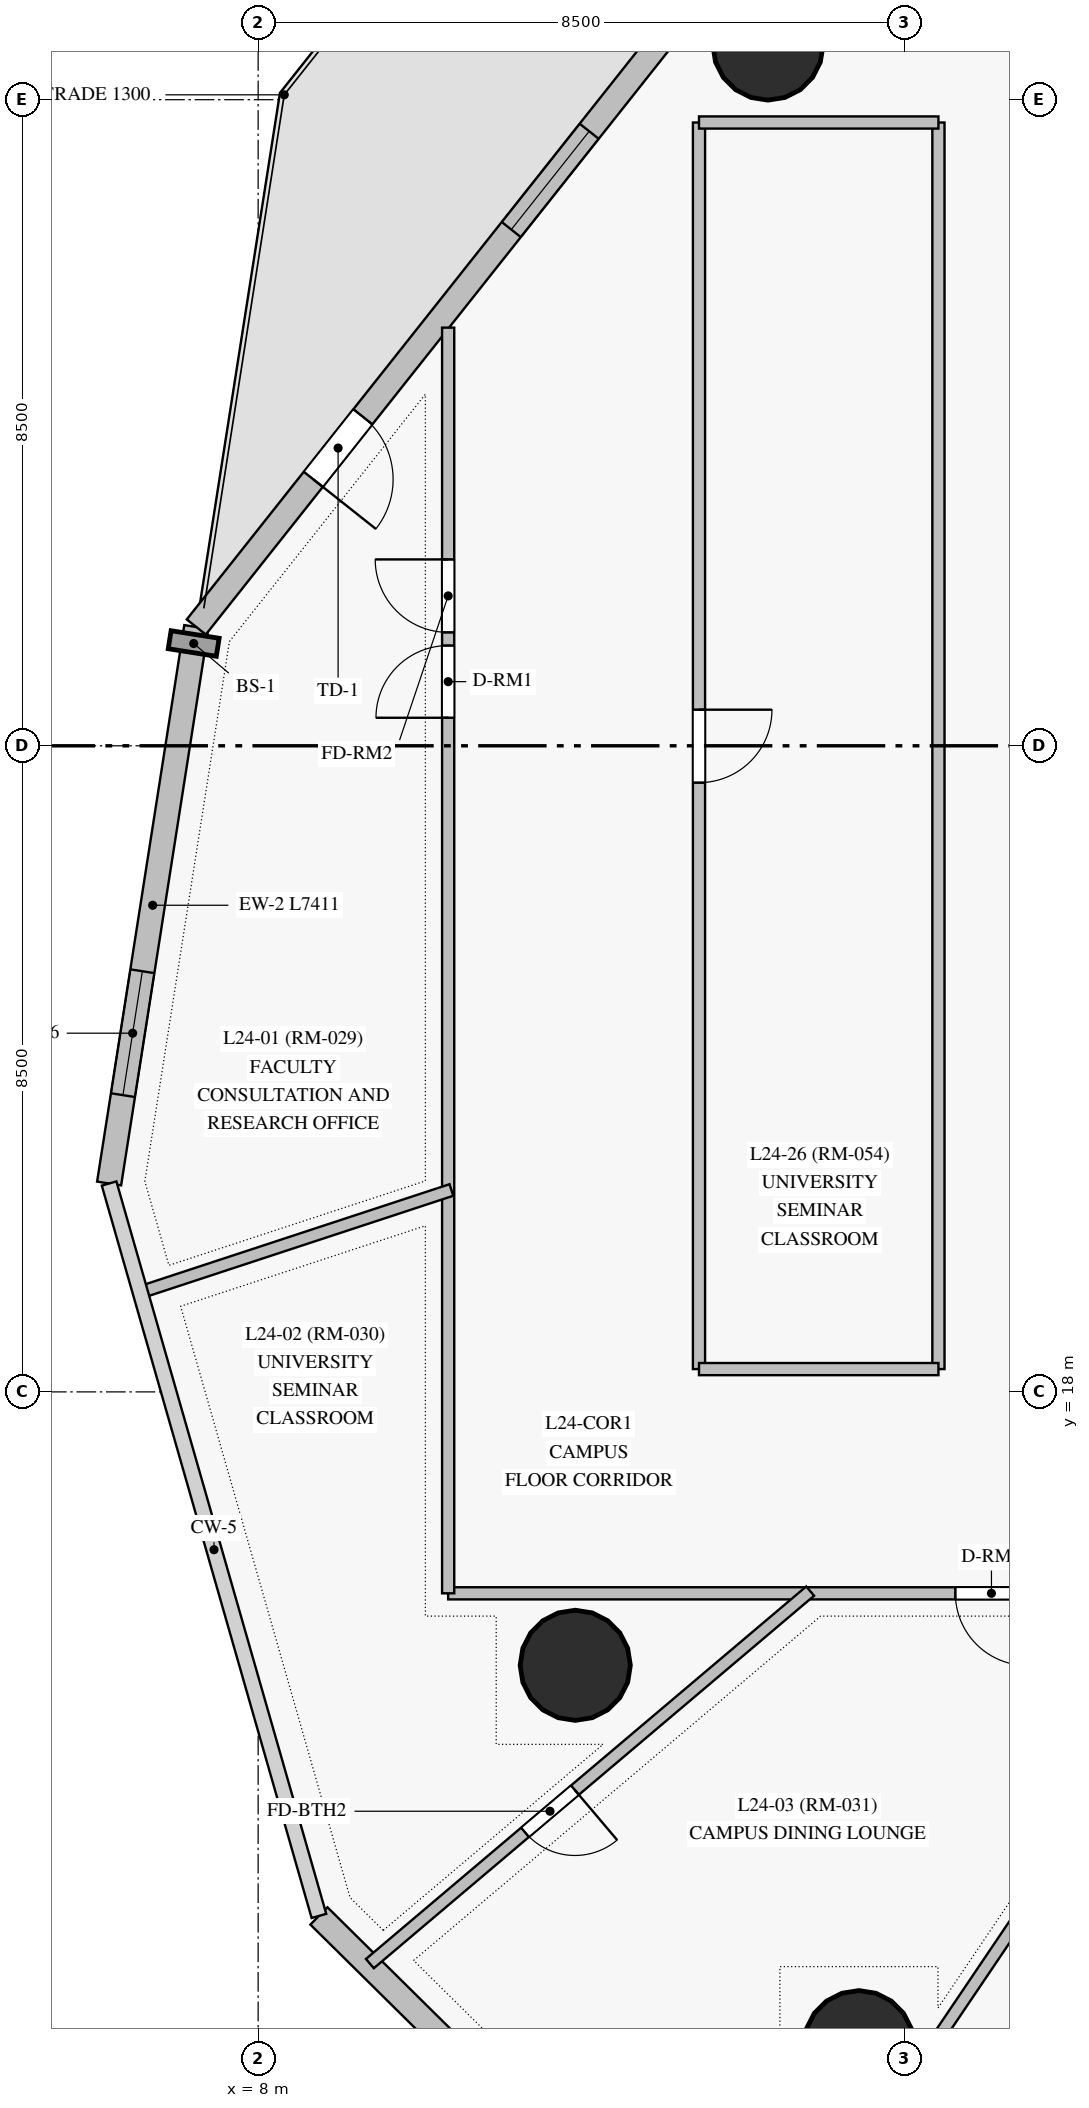
"""IFC4 building model, lengths in metres.
Left out: names, types, materials, properties, quantities, classifications, styles, units other than length and angle.
Written with IfcOpenShell. Run it as: python <this file> out.ifc"""

import sys

from ifc_helpers import new_model, si_unit, direction, frame, frame_2d, origin, origin_with_axes, origin_2d, place, context, subcontext, project, spatial, rectangle, circle, extrude, source, transform, mapped, element, fill, save


model = new_model("IFC4")
c1 = context("Model", 3, precision=1e-05, world=origin(), true_north=direction((0.0, 1.0)))
c2 = subcontext(c1, "Body", "Model", "MODEL_VIEW")
j1 = project(units=[si_unit("LENGTHUNIT", "METRE"), si_unit("PLANEANGLEUNIT", "RADIAN")], contexts=[c1])
p1 = place(None, origin())
s1 = spatial("IfcSite", under=j1, at=p1, CompositionType="ELEMENT")
p2 = place(p1, origin())
s2 = spatial("IfcBuilding", under=s1, at=p2, CompositionType="ELEMENT")
p3 = place(p2, frame((0.0, 0.0, 92.2)))
s3 = spatial("IfcBuildingStorey", under=s2, at=p3, CompositionType="ELEMENT", Elevation=92.2)
m1 = source(origin_with_axes(), c2, "Body", "SweptSolid", [
    extrude(circle(Radius=0.725, at=origin_2d()), origin(), (0.0, 0.0, 1.0), 4.0),
])
for number, where, z_axis, x_axis in (
    (1, (14.707, 35.719, 0.0), (0.0, 0.0, 1.0), (1.0, 0.0, 0.0)),
    (2, (12.172, 14.403, 0.0), (0.0, 0.0, 1.0), (1.0, 0.0, 0.0)),
    (3, (15.904, 9.399, 0.0), (0.0, 0.0, 1.0), (1.0, 0.0, 0.0)),
):
    element("IfcColumn", number, at=place(p3, frame(where, z_axis=z_axis, x_axis=x_axis)), inside=s3, PredefinedType="COLUMN", context=c2, shape_type="MappedRepresentation", body=[
        mapped(m1, transform((0.0, 0.0, 0.0), scale=1.0)),
    ])
p4 = place(p3, frame((7.186, 28.063, 0.0), z_axis=(0.0, 0.0, 1.0), x_axis=(-0.154769806467, -0.987950558989, 0.0)))
e4 = element("IfcWall", 4, at=p4, inside=s3, PredefinedType="SOLIDWALL", context=c2, shape_type="SweptSolid", body=[
    extrude(rectangle(XDim=7.411, YDim=0.32, at=frame_2d((3.706, 0.0))), origin(), (0.0, 0.0, 1.0), 3.445),
])
p5 = place(p4, frame((4.584, 0.0, 0.85)))
e5 = element("IfcOpeningElement", 5, at=p5, cuts=e4, PredefinedType="OPENING", context=c2, shape_type="SweptSolid", body=[
    extrude(rectangle(XDim=1.65, YDim=1.65, at=frame_2d((0.825, 0.825))), frame((0.0, 0.17, 0.0), z_axis=(0.0, -1.0, 0.0), x_axis=(1.0, 0.0, 0.0)), (0.0, 0.0, 1.0), 0.34),
])
p6 = place(p3, frame((8.8, 11.106, 0.0), z_axis=(0.0, 0.0, 1.0), x_axis=(0.711166138023, -0.703023985459, 0.0)))
e6 = element("IfcWall", 6, at=p6, inside=s3, PredefinedType="SOLIDWALL", context=c2, shape_type="SweptSolid", body=[
    extrude(rectangle(XDim=12.474, YDim=0.32, at=frame_2d((6.237, 0.0))), origin(), (0.0, 0.0, 1.0), 3.775),
])
p7 = place(p6, frame((3.52, 0.0, 0.85)))
e7 = element("IfcOpeningElement", 7, at=p7, cuts=e6, PredefinedType="OPENING", context=c2, shape_type="SweptSolid", body=[
    extrude(rectangle(XDim=1.65, YDim=1.65, at=frame_2d((0.825, 0.825))), frame((0.0, 0.17, 0.0), z_axis=(0.0, -1.0, 0.0), x_axis=(1.0, 0.0, 0.0)), (0.0, 0.0, 1.0), 0.34),
])
p8 = place(p6, frame((8.766, 0.0, 0.85)))
e8 = element("IfcOpeningElement", 8, at=p8, cuts=e6, PredefinedType="OPENING", context=c2, shape_type="SweptSolid", body=[
    extrude(rectangle(XDim=1.65, YDim=1.65, at=frame_2d((0.825, 0.825))), frame((0.0, 0.17, 0.0), z_axis=(0.0, -1.0, 0.0), x_axis=(1.0, 0.0, 0.0)), (0.0, 0.0, 1.0), 0.34),
])
p9 = place(p3, frame((22.111, 46.894, 0.0), z_axis=(0.0, 0.0, 1.0), x_axis=(-0.621146049856, -0.783694828839, 0.0)))
e9 = element("IfcWall", 9, at=p9, inside=s3, PredefinedType="SOLIDWALL", context=c2, shape_type="SweptSolid", body=[
    extrude(rectangle(XDim=24.028, YDim=0.32, at=frame_2d((12.014, 0.0))), origin(), (0.0, 0.0, 1.0), 3.445),
])
p10 = place(p9, frame((5.801, 0.0, 0.85)))
e10 = element("IfcOpeningElement", 10, at=p10, cuts=e9, PredefinedType="OPENING", context=c2, shape_type="SweptSolid", body=[
    extrude(rectangle(XDim=1.65, YDim=1.65, at=frame_2d((0.825, 0.825))), frame((0.0, 0.17, 0.0), z_axis=(0.0, -1.0, 0.0), x_axis=(1.0, 0.0, 0.0)), (0.0, 0.0, 1.0), 0.34),
])
p11 = place(p9, frame((15.706, 0.0, 0.85)))
e11 = element("IfcOpeningElement", 11, at=p11, cuts=e9, PredefinedType="OPENING", context=c2, shape_type="SweptSolid", body=[
    extrude(rectangle(XDim=1.65, YDim=1.65, at=frame_2d((0.825, 0.825))), frame((0.0, 0.17, 0.0), z_axis=(0.0, -1.0, 0.0), x_axis=(1.0, 0.0, 0.0)), (0.0, 0.0, 1.0), 0.34),
])
p12 = place(p9, frame((20.5, 0.0, 0.0)))
e12 = element("IfcOpeningElement", 12, at=p12, cuts=e9, PredefinedType="OPENING", context=c2, shape_type="SweptSolid", body=[
    extrude(rectangle(XDim=1.05, YDim=2.12, at=frame_2d((0.525, 1.06))), frame((0.0, 0.17, 0.0), z_axis=(0.0, -1.0, 0.0), x_axis=(1.0, 0.0, 0.0)), (0.0, 0.0, 1.0), 0.34),
])
p13 = place(p3, frame((40.25, 15.35, 0.0), z_axis=(0.0, 0.0, 1.0), x_axis=(-1.0, 0.0, 0.0)))
e13 = element("IfcWall", 13, at=p13, inside=s3, PredefinedType="PARTITIONING", context=c2, shape_type="SweptSolid", body=[
    extrude(rectangle(XDim=29.75, YDim=0.16, at=frame_2d((14.875, 0.0))), origin(), (0.0, 0.0, 1.0), 2.975),
])
p14 = place(p13, frame((22.127, 0.0, 0.0)))
e14 = element("IfcOpeningElement", 14, at=p14, cuts=e13, PredefinedType="OPENING", context=c2, shape_type="SweptSolid", body=[
    extrude(rectangle(XDim=0.95, YDim=2.15, at=frame_2d((0.475, 1.075))), frame((0.0, 0.09, 0.0), z_axis=(0.0, -1.0, 0.0), x_axis=(1.0, 0.0, 0.0)), (0.0, 0.0, 1.0), 0.18),
])
p15 = place(p13, frame((14.4, 0.0, 0.0)))
e15 = element("IfcOpeningElement", 15, at=p15, cuts=e13, PredefinedType="OPENING", context=c2, shape_type="SweptSolid", body=[
    extrude(rectangle(XDim=0.96, YDim=2.15, at=frame_2d((0.48, 1.075))), frame((0.0, 0.09, 0.0), z_axis=(0.0, -1.0, 0.0), x_axis=(1.0, 0.0, 0.0)), (0.0, 0.0, 1.0), 0.18),
])
p16 = place(p13, frame((10.177, 0.0, 0.0)))
e16 = element("IfcOpeningElement", 16, at=p16, cuts=e13, PredefinedType="OPENING", context=c2, shape_type="SweptSolid", body=[
    extrude(rectangle(XDim=0.96, YDim=2.15, at=frame_2d((0.48, 1.075))), frame((0.0, 0.09, 0.0), z_axis=(0.0, -1.0, 0.0), x_axis=(1.0, 0.0, 0.0)), (0.0, 0.0, 1.0), 0.18),
])
p17 = place(p13, frame((8.254, 0.0, 0.0)))
e17 = element("IfcOpeningElement", 17, at=p17, cuts=e13, PredefinedType="OPENING", context=c2, shape_type="SweptSolid", body=[
    extrude(rectangle(XDim=0.95, YDim=2.15, at=frame_2d((0.475, 1.075))), frame((0.0, 0.09, 0.0), z_axis=(0.0, -1.0, 0.0), x_axis=(1.0, 0.0, 0.0)), (0.0, 0.0, 1.0), 0.18),
])
p18 = place(p13, frame((3.417, 0.0, 0.0)))
e18 = element("IfcOpeningElement", 18, at=p18, cuts=e13, PredefinedType="OPENING", context=c2, shape_type="SweptSolid", body=[
    extrude(rectangle(XDim=0.96, YDim=2.15, at=frame_2d((0.48, 1.075))), frame((0.0, 0.09, 0.0), z_axis=(0.0, -1.0, 0.0), x_axis=(1.0, 0.0, 0.0)), (0.0, 0.0, 1.0), 0.18),
])
p19 = place(p3, frame((10.5, 15.35, 0.0), z_axis=(0.0, 0.0, 1.0), x_axis=(0.0, 1.0, 0.0)))
e19 = element("IfcWall", 19, at=p19, inside=s3, PredefinedType="PARTITIONING", context=c2, shape_type="SweptSolid", body=[
    extrude(rectangle(XDim=16.651, YDim=0.16, at=frame_2d((8.326, 0.0))), origin(), (0.0, 0.0, 1.0), 3.445),
])
p20 = place(p19, frame((11.519, 0.0, 0.0)))
e20 = element("IfcOpeningElement", 20, at=p20, cuts=e19, PredefinedType="OPENING", context=c2, shape_type="SweptSolid", body=[
    extrude(rectangle(XDim=0.95, YDim=2.15, at=frame_2d((0.475, 1.075))), frame((0.0, 0.09, 0.0), z_axis=(0.0, -1.0, 0.0), x_axis=(1.0, 0.0, 0.0)), (0.0, 0.0, 1.0), 0.18),
])
p21 = place(p19, frame((12.642, 0.0, 0.0)))
e21 = element("IfcOpeningElement", 21, at=p21, cuts=e19, PredefinedType="OPENING", context=c2, shape_type="SweptSolid", body=[
    extrude(rectangle(XDim=0.96, YDim=2.15, at=frame_2d((0.48, 1.075))), frame((0.0, 0.09, 0.0), z_axis=(0.0, -1.0, 0.0), x_axis=(1.0, 0.0, 0.0)), (0.0, 0.0, 1.0), 0.18),
])
p22 = place(p3, frame((13.8, 34.7, 0.0), z_axis=(0.0, 0.0, 1.0), x_axis=(0.0, -1.0, 0.0)))
e22 = element("IfcWall", 22, at=p22, inside=s3, PredefinedType="PARTITIONING", context=c2, shape_type="SweptSolid", body=[
    extrude(rectangle(XDim=16.4, YDim=0.16, at=frame_2d((8.2, 0.0))), origin(), (0.0, 0.0, 1.0), 3.175),
])
p23 = place(p22, frame((7.725, 0.0, 0.0)))
e23 = element("IfcOpeningElement", 23, at=p23, cuts=e22, PredefinedType="OPENING", context=c2, shape_type="SweptSolid", body=[
    extrude(rectangle(XDim=0.96, YDim=2.15, at=frame_2d((0.48, 1.075))), frame((0.0, 0.09, 0.0), z_axis=(0.0, -1.0, 0.0), x_axis=(1.0, 0.0, 0.0)), (0.0, 0.0, 1.0), 0.18),
])
p24 = place(p3, frame((16.95, 18.3, 0.0), z_axis=(0.0, 0.0, 1.0), x_axis=(0.0, 1.0, 0.0)))
e24 = element("IfcWall", 24, at=p24, inside=s3, PredefinedType="PARTITIONING", context=c2, shape_type="SweptSolid", body=[
    extrude(rectangle(XDim=16.4, YDim=0.16, at=frame_2d((8.2, 0.0))), origin(), (0.0, 0.0, 1.0), 3.275),
])
p25 = place(p3, frame((21.681, 12.744, 0.0), z_axis=(0.0, 0.0, 1.0), x_axis=(-0.440615293115, -0.897696030666, 0.0)))
e25 = element("IfcWall", 25, at=p25, inside=s3, PredefinedType="PARTITIONING", context=c2, shape_type="SweptSolid", body=[
    extrude(rectangle(XDim=10.75, YDim=0.16, at=frame_2d((5.375, 0.0))), origin(), (0.0, 0.0, 1.0), 3.775),
])
p26 = place(p3, frame((15.262, 15.379, 0.0), z_axis=(0.0, 0.0, 1.0), x_axis=(-0.763431442255, -0.645888870454, 0.0)))
e26 = element("IfcWall", 26, at=p26, inside=s3, PredefinedType="PARTITIONING", context=c2, shape_type="SweptSolid", body=[
    extrude(rectangle(XDim=7.587, YDim=0.16, at=frame_2d((3.794, 0.0))), origin(), (0.0, 0.0, 1.0), 2.975),
])
p27 = place(p26, frame((4.054, 0.0, 0.0)))
e27 = element("IfcOpeningElement", 27, at=p27, cuts=e26, PredefinedType="OPENING", context=c2, shape_type="SweptSolid", body=[
    extrude(rectangle(XDim=0.86, YDim=2.04, at=frame_2d((0.43, 1.02))), frame((0.0, 0.09, 0.0), z_axis=(0.0, -1.0, 0.0), x_axis=(1.0, 0.0, 0.0)), (0.0, 0.0, 1.0), 0.18),
])
p28 = place(p3, frame((19.875, 13.839, 0.0), z_axis=(0.0, 0.0, 1.0), x_axis=(-0.559775304188, -0.82864444053, 0.0)))
e28 = element("IfcWall", 28, at=p28, inside=s3, PredefinedType="PARTITIONING", context=c2, shape_type="SweptSolid", body=[
    extrude(rectangle(XDim=5.628, YDim=0.16, at=frame_2d((2.814, 0.0))), origin(), (0.0, 0.0, 1.0), 3.775),
])
p29 = place(p28, frame((2.339, 0.0, 0.0)))
e29 = element("IfcOpeningElement", 29, at=p29, cuts=e28, PredefinedType="OPENING", context=c2, shape_type="SweptSolid", body=[
    extrude(rectangle(XDim=0.95, YDim=2.15, at=frame_2d((0.475, 1.075))), frame((0.0, 0.09, 0.0), z_axis=(0.0, -1.0, 0.0), x_axis=(1.0, 0.0, 0.0)), (0.0, 0.0, 1.0), 0.18),
])
p30 = place(p3, frame((10.543, 20.656, 0.0), z_axis=(0.0, 0.0, 1.0), x_axis=(-0.949929573631, -0.312464086161, 0.0)))
e30 = element("IfcWall", 30, at=p30, inside=s3, PredefinedType="PARTITIONING", context=c2, shape_type="SweptSolid", body=[
    extrude(rectangle(XDim=4.284, YDim=0.16, at=frame_2d((2.142, 0.0))), origin(), (0.0, 0.0, 1.0), 3.775),
])
p31 = place(p3, frame((16.95, 34.7, 0.0), z_axis=(0.0, 0.0, 1.0), x_axis=(-1.0, 0.0, 0.0)))
e31 = element("IfcWall", 31, at=p31, inside=s3, PredefinedType="PARTITIONING", context=c2, shape_type="SweptSolid", body=[
    extrude(rectangle(XDim=3.15, YDim=0.16, at=frame_2d((1.575, 0.0))), origin(), (0.0, 0.0, 1.0), 2.975),
])
p32 = place(p3, frame((13.8, 18.3, 0.0), z_axis=(0.0, 0.0, 1.0), x_axis=(1.0, 0.0, 0.0)))
e32 = element("IfcWall", 32, at=p32, inside=s3, PredefinedType="PARTITIONING", context=c2, shape_type="SweptSolid", body=[
    extrude(rectangle(XDim=3.15, YDim=0.16, at=frame_2d((1.575, 0.0))), origin(), (0.0, 0.0, 1.0), 3.775),
])
m2 = source(origin_with_axes(), c2, "Body", "SweptSolid", [
    extrude(rectangle(XDim=1.65, YDim=1.65, at=frame_2d((0.825, 0.825))), frame((0.0, 0.03, 0.0), z_axis=(0.0, -1.0, 0.0), x_axis=(1.0, 0.0, 0.0)), (0.0, 0.0, 1.0), 0.06),
])
p33 = place(p5, origin())
e33 = element("IfcWindow", 33, at=p33, inside=s3, PartitioningType="SINGLE_PANEL", PredefinedType="WINDOW", context=c2, shape_type="MappedRepresentation", body=[
    mapped(m2, transform((0.0, 0.0, 0.0), scale=1.0)),
])
fill(e5, e33)
p34 = place(p11, origin())
e34 = element("IfcWindow", 34, at=p34, inside=s3, PartitioningType="SINGLE_PANEL", PredefinedType="WINDOW", context=c2, shape_type="MappedRepresentation", body=[
    mapped(m2, transform((0.0, 0.0, 0.0), scale=1.0)),
])
fill(e11, e34)
m3 = source(origin_with_axes(), c2, "Body", "SweptSolid", [
    extrude(rectangle(XDim=1.05, YDim=2.12, at=frame_2d((0.525, 1.06))), frame((0.0, 0.025, 0.0), z_axis=(0.0, -1.0, 0.0), x_axis=(1.0, 0.0, 0.0)), (0.0, 0.0, 1.0), 0.05),
])
p35 = place(p12, origin())
e35 = element("IfcDoor", 35, at=p35, inside=s3, OperationType="SINGLE_SWING_RIGHT", PredefinedType="DOOR", context=c2, shape_type="MappedRepresentation", body=[
    mapped(m3, transform((0.0, 0.0, 0.0), scale=1.0)),
])
fill(e12, e35)
m4 = source(origin_with_axes(), c2, "Body", "SweptSolid", [
    extrude(rectangle(XDim=0.95, YDim=2.15, at=frame_2d((0.475, 1.075))), frame((0.0, 0.025, 0.0), z_axis=(0.0, -1.0, 0.0), x_axis=(1.0, 0.0, 0.0)), (0.0, 0.0, 1.0), 0.05),
])
p36 = place(p20, origin())
e36 = element("IfcDoor", 36, at=p36, inside=s3, OperationType="SINGLE_SWING_LEFT", PredefinedType="DOOR", context=c2, shape_type="MappedRepresentation", body=[
    mapped(m4, transform((0.0, 0.0, 0.0), scale=1.0)),
])
fill(e20, e36)
m5 = source(origin_with_axes(), c2, "Body", "SweptSolid", [
    extrude(rectangle(XDim=0.96, YDim=2.15, at=frame_2d((0.48, 1.075))), frame((0.0, 0.025, 0.0), z_axis=(0.0, -1.0, 0.0), x_axis=(1.0, 0.0, 0.0)), (0.0, 0.0, 1.0), 0.05),
])
p37 = place(p21, origin())
e37 = element("IfcDoor", 37, at=p37, inside=s3, OperationType="SINGLE_SWING_RIGHT", PredefinedType="DOOR", context=c2, shape_type="MappedRepresentation", body=[
    mapped(m5, transform((0.0, 0.0, 0.0), scale=1.0)),
])
fill(e21, e37)
p38 = place(p14, origin())
e38 = element("IfcDoor", 38, at=p38, inside=s3, OperationType="SINGLE_SWING_LEFT", PredefinedType="DOOR", context=c2, shape_type="MappedRepresentation", body=[
    mapped(m4, transform((0.0, 0.0, 0.0), scale=1.0)),
])
fill(e14, e38)
p39 = place(p23, origin())
e39 = element("IfcDoor", 39, at=p39, inside=s3, OperationType="SINGLE_SWING_LEFT", PredefinedType="DOOR", context=c2, shape_type="MappedRepresentation", body=[
    mapped(m5, transform((0.0, 0.0, 0.0), scale=1.0)),
])
fill(e23, e39)
m6 = source(origin_with_axes(), c2, "Body", "SweptSolid", [
    extrude(rectangle(XDim=0.86, YDim=2.04, at=frame_2d((0.43, 1.02))), frame((0.0, 0.025, 0.0), z_axis=(0.0, -1.0, 0.0), x_axis=(1.0, 0.0, 0.0)), (0.0, 0.0, 1.0), 0.05),
])
p40 = place(p27, origin())
e40 = element("IfcDoor", 40, at=p40, inside=s3, OperationType="SINGLE_SWING_LEFT", PredefinedType="DOOR", context=c2, shape_type="MappedRepresentation", body=[
    mapped(m6, transform((0.0, 0.0, 0.0), scale=1.0)),
])
fill(e27, e40)
save(model, sys.argv[1])
